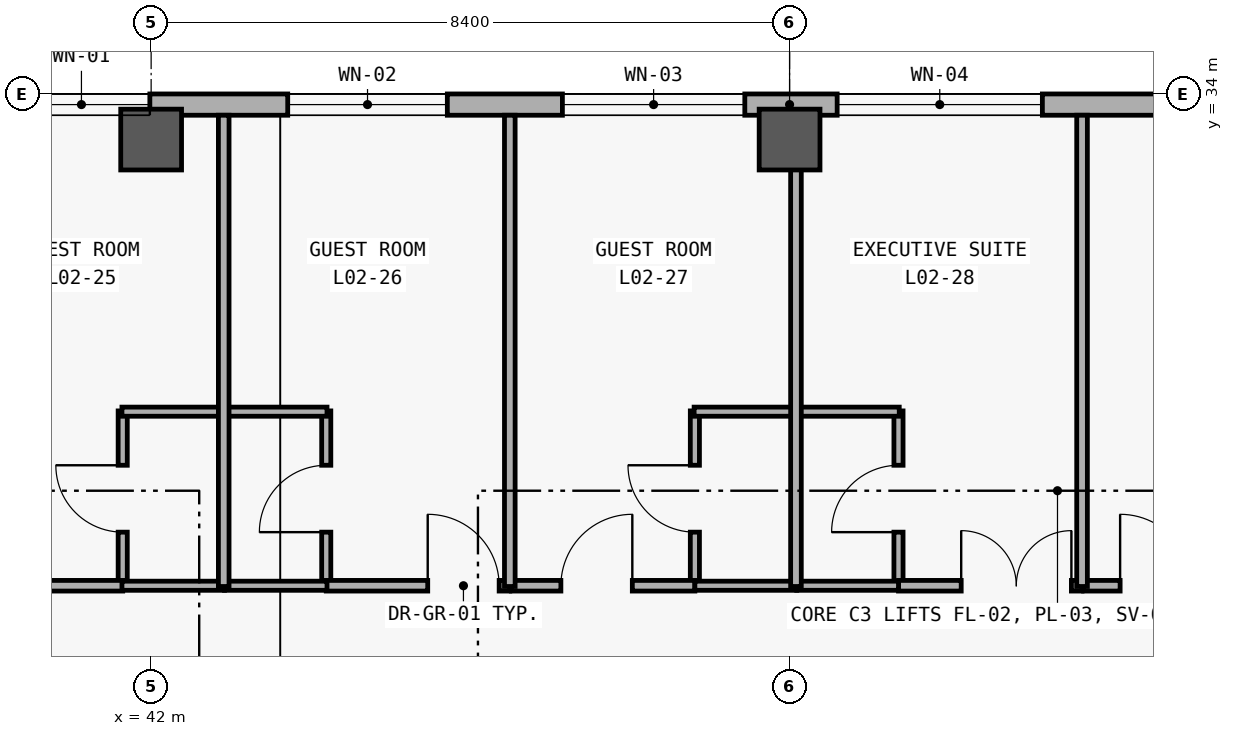
"""IFC4 building model, lengths in metres.
Left out: names, types, materials, properties, quantities, classifications, styles, units other than length and angle.
Written with IfcOpenShell. Run it as: python <this file> out.ifc"""

import sys

from ifc_helpers import new_model, si_unit, direction, frame, frame_2d, origin, origin_2d, place, context, subcontext, project, spatial, rectangle, extrude, element, fill, save


model = new_model("IFC4")
c1 = context("Model", 3, precision=1e-05, world=origin(), true_north=direction((0.0, 1.0)))
c2 = subcontext(c1, "Body", "Model", "MODEL_VIEW")
j1 = project(units=[si_unit("LENGTHUNIT", "METRE"), si_unit("PLANEANGLEUNIT", "RADIAN")], contexts=[c1])
p1 = place(None, origin())
s1 = spatial("IfcSite", under=j1, at=p1, CompositionType="ELEMENT")
p2 = place(p1, origin())
s2 = spatial("IfcBuilding", under=s1, at=p2, CompositionType="ELEMENT")
p3 = place(p2, frame((0.0, 0.0, 10.8)))
s3 = spatial("IfcBuildingStorey", under=s2, at=p3, CompositionType="ELEMENT", Elevation=10.8)
for number, where, z_axis, x_axis in (
    (1, (42.0, 33.4, 0.0), (0.0, 0.0, 1.0), (1.0, 0.0, 0.0)),
    (2, (50.4, 33.4, 0.0), (0.0, 0.0, 1.0), (1.0, 0.0, 0.0)),
):
    element("IfcColumn", number, at=place(p3, frame(where, z_axis=z_axis, x_axis=x_axis)), inside=s3, PredefinedType="COLUMN", context=c2, shape_type="SweptSolid", body=[
        extrude(rectangle(XDim=0.8, YDim=0.8, at=origin_2d()), origin(), (0.0, 0.0, 1.0), 4.2),
    ])
p4 = place(p3, frame((8.68, 33.86, 0.0), z_axis=(0.0, 0.0, 1.0), x_axis=(1.0, 0.0, 0.0)))
e3 = element("IfcWall", 3, at=p4, inside=s3, PredefinedType="SOLIDWALL", context=c2, shape_type="SweptSolid", body=[
    extrude(rectangle(XDim=83.44, YDim=0.28, at=frame_2d((41.72, 0.0))), origin(), (0.0, 0.0, 1.0), 3.92),
])
p5 = place(p4, frame((5.07, 0.0, 0.85)))
e4 = element("IfcOpeningElement", 4, at=p5, cuts=e3, PredefinedType="OPENING", context=c2, shape_type="SweptSolid", body=[
    extrude(rectangle(XDim=1.7, YDim=2.0, at=frame_2d((0.85, 1.0))), frame((0.0, 0.15, 0.0), z_axis=(0.0, -1.0, 0.0), x_axis=(1.0, 0.0, 0.0)), (0.0, 0.0, 1.0), 0.3),
])
p6 = place(p4, frame((12.557, 0.0, 0.85)))
e5 = element("IfcOpeningElement", 5, at=p6, cuts=e3, PredefinedType="OPENING", context=c2, shape_type="SweptSolid", body=[
    extrude(rectangle(XDim=2.05, YDim=1.95, at=frame_2d((1.025, 0.975))), frame((0.0, 0.15, 0.0), z_axis=(0.0, -1.0, 0.0), x_axis=(1.0, 0.0, 0.0)), (0.0, 0.0, 1.0), 0.3),
])
p7 = place(p4, frame((16.256, 0.0, 0.85)))
e6 = element("IfcOpeningElement", 6, at=p7, cuts=e3, PredefinedType="OPENING", context=c2, shape_type="SweptSolid", body=[
    extrude(rectangle(XDim=2.18, YDim=1.95, at=frame_2d((1.09, 0.975))), frame((0.0, 0.15, 0.0), z_axis=(0.0, -1.0, 0.0), x_axis=(1.0, 0.0, 0.0)), (0.0, 0.0, 1.0), 0.3),
])
p8 = place(p4, frame((19.921, 0.0, 0.85)))
e7 = element("IfcOpeningElement", 7, at=p8, cuts=e3, PredefinedType="OPENING", context=c2, shape_type="SweptSolid", body=[
    extrude(rectangle(XDim=2.38, YDim=1.95, at=frame_2d((1.19, 0.975))), frame((0.0, 0.15, 0.0), z_axis=(0.0, -1.0, 0.0), x_axis=(1.0, 0.0, 0.0)), (0.0, 0.0, 1.0), 0.3),
])
p9 = place(p4, frame((23.635, 0.0, 0.85)))
e8 = element("IfcOpeningElement", 8, at=p9, cuts=e3, PredefinedType="OPENING", context=c2, shape_type="SweptSolid", body=[
    extrude(rectangle(XDim=2.48, YDim=2.0, at=frame_2d((1.24, 1.0))), frame((0.0, 0.15, 0.0), z_axis=(0.0, -1.0, 0.0), x_axis=(1.0, 0.0, 0.0)), (0.0, 0.0, 1.0), 0.3),
])
p10 = place(p4, frame((27.314, 0.0, 0.85)))
e9 = element("IfcOpeningElement", 9, at=p10, cuts=e3, PredefinedType="OPENING", context=c2, shape_type="SweptSolid", body=[
    extrude(rectangle(XDim=2.65, YDim=2.0, at=frame_2d((1.325, 1.0))), frame((0.0, 0.15, 0.0), z_axis=(0.0, -1.0, 0.0), x_axis=(1.0, 0.0, 0.0)), (0.0, 0.0, 1.0), 0.3),
])
p11 = place(p4, frame((31.503, 0.0, 0.85)))
e10 = element("IfcOpeningElement", 10, at=p11, cuts=e3, PredefinedType="OPENING", context=c2, shape_type="SweptSolid", body=[
    extrude(rectangle(XDim=1.8, YDim=1.8, at=frame_2d((0.9, 0.9))), frame((0.0, 0.15, 0.0), z_axis=(0.0, -1.0, 0.0), x_axis=(1.0, 0.0, 0.0)), (0.0, 0.0, 1.0), 0.3),
])
p12 = place(p4, frame((35.117, 0.0, 0.85)))
e11 = element("IfcOpeningElement", 11, at=p12, cuts=e3, PredefinedType="OPENING", context=c2, shape_type="SweptSolid", body=[
    extrude(rectangle(XDim=2.1, YDim=1.8, at=frame_2d((1.05, 0.9))), frame((0.0, 0.15, 0.0), z_axis=(0.0, -1.0, 0.0), x_axis=(1.0, 0.0, 0.0)), (0.0, 0.0, 1.0), 0.3),
])
p13 = place(p4, frame((38.731, 0.0, 0.85)))
e12 = element("IfcOpeningElement", 12, at=p13, cuts=e3, PredefinedType="OPENING", context=c2, shape_type="SweptSolid", body=[
    extrude(rectangle(XDim=2.4, YDim=1.8, at=frame_2d((1.2, 0.9))), frame((0.0, 0.15, 0.0), z_axis=(0.0, -1.0, 0.0), x_axis=(1.0, 0.0, 0.0)), (0.0, 0.0, 1.0), 0.3),
])
p14 = place(p4, frame((42.346, 0.0, 0.85)))
e13 = element("IfcOpeningElement", 13, at=p14, cuts=e3, PredefinedType="OPENING", context=c2, shape_type="SweptSolid", body=[
    extrude(rectangle(XDim=2.7, YDim=1.85, at=frame_2d((1.35, 0.925))), frame((0.0, 0.15, 0.0), z_axis=(0.0, -1.0, 0.0), x_axis=(1.0, 0.0, 0.0)), (0.0, 0.0, 1.0), 0.3),
])
p15 = place(p4, frame((46.71, 0.0, 0.85)))
e14 = element("IfcOpeningElement", 14, at=p15, cuts=e3, PredefinedType="OPENING", context=c2, shape_type="SweptSolid", body=[
    extrude(rectangle(XDim=1.5, YDim=1.75, at=frame_2d((0.75, 0.875))), frame((0.0, 0.15, 0.0), z_axis=(0.0, -1.0, 0.0), x_axis=(1.0, 0.0, 0.0)), (0.0, 0.0, 1.0), 0.3),
])
p16 = place(p4, frame((50.399, 0.0, 0.85)))
e15 = element("IfcOpeningElement", 15, at=p16, cuts=e3, PredefinedType="OPENING", context=c2, shape_type="SweptSolid", body=[
    extrude(rectangle(XDim=1.65, YDim=1.75, at=frame_2d((0.825, 0.875))), frame((0.0, 0.15, 0.0), z_axis=(0.0, -1.0, 0.0), x_axis=(1.0, 0.0, 0.0)), (0.0, 0.0, 1.0), 0.3),
])
p17 = place(p4, frame((54.014, 0.0, 0.85)))
e16 = element("IfcOpeningElement", 16, at=p17, cuts=e3, PredefinedType="OPENING", context=c2, shape_type="SweptSolid", body=[
    extrude(rectangle(XDim=1.95, YDim=1.75, at=frame_2d((0.975, 0.875))), frame((0.0, 0.15, 0.0), z_axis=(0.0, -1.0, 0.0), x_axis=(1.0, 0.0, 0.0)), (0.0, 0.0, 1.0), 0.3),
])
p18 = place(p4, frame((57.628, 0.0, 0.85)))
e17 = element("IfcOpeningElement", 17, at=p18, cuts=e3, PredefinedType="OPENING", context=c2, shape_type="SweptSolid", body=[
    extrude(rectangle(XDim=2.25, YDim=1.75, at=frame_2d((1.125, 0.875))), frame((0.0, 0.15, 0.0), z_axis=(0.0, -1.0, 0.0), x_axis=(1.0, 0.0, 0.0)), (0.0, 0.0, 1.0), 0.3),
])
p19 = place(p4, frame((61.242, 0.0, 0.85)))
e18 = element("IfcOpeningElement", 18, at=p19, cuts=e3, PredefinedType="OPENING", context=c2, shape_type="SweptSolid", body=[
    extrude(rectangle(XDim=2.55, YDim=1.8, at=frame_2d((1.275, 0.9))), frame((0.0, 0.15, 0.0), z_axis=(0.0, -1.0, 0.0), x_axis=(1.0, 0.0, 0.0)), (0.0, 0.0, 1.0), 0.3),
])
p20 = place(p4, frame((64.856, 0.0, 0.85)))
e19 = element("IfcOpeningElement", 19, at=p20, cuts=e3, PredefinedType="OPENING", context=c2, shape_type="SweptSolid", body=[
    extrude(rectangle(XDim=2.85, YDim=1.85, at=frame_2d((1.425, 0.925))), frame((0.0, 0.15, 0.0), z_axis=(0.0, -1.0, 0.0), x_axis=(1.0, 0.0, 0.0)), (0.0, 0.0, 1.0), 0.3),
])
p21 = place(p4, frame((69.345, 0.0, 0.85)))
e20 = element("IfcOpeningElement", 20, at=p21, cuts=e3, PredefinedType="OPENING", context=c2, shape_type="SweptSolid", body=[
    extrude(rectangle(XDim=1.4, YDim=1.6, at=frame_2d((0.7, 0.8))), frame((0.0, 0.15, 0.0), z_axis=(0.0, -1.0, 0.0), x_axis=(1.0, 0.0, 0.0)), (0.0, 0.0, 1.0), 0.3),
])
p22 = place(p4, frame((73.009, 0.0, 0.85)))
e21 = element("IfcOpeningElement", 21, at=p22, cuts=e3, PredefinedType="OPENING", context=c2, shape_type="SweptSolid", body=[
    extrude(rectangle(XDim=1.6, YDim=1.6, at=frame_2d((0.8, 0.8))), frame((0.0, 0.15, 0.0), z_axis=(0.0, -1.0, 0.0), x_axis=(1.0, 0.0, 0.0)), (0.0, 0.0, 1.0), 0.3),
])
p23 = place(p4, frame((76.674, 0.0, 0.85)))
e22 = element("IfcOpeningElement", 22, at=p23, cuts=e3, PredefinedType="OPENING", context=c2, shape_type="SweptSolid", body=[
    extrude(rectangle(XDim=1.8, YDim=1.6, at=frame_2d((0.9, 0.8))), frame((0.0, 0.15, 0.0), z_axis=(0.0, -1.0, 0.0), x_axis=(1.0, 0.0, 0.0)), (0.0, 0.0, 1.0), 0.3),
])
p24 = place(p4, frame((80.338, 0.0, 0.85)))
e23 = element("IfcOpeningElement", 23, at=p24, cuts=e3, PredefinedType="OPENING", context=c2, shape_type="SweptSolid", body=[
    extrude(rectangle(XDim=2.0, YDim=1.65, at=frame_2d((1.0, 0.825))), frame((0.0, 0.15, 0.0), z_axis=(0.0, -1.0, 0.0), x_axis=(1.0, 0.0, 0.0)), (0.0, 0.0, 1.0), 0.3),
])
p25 = place(p3, frame((41.626, 27.52, 0.0), z_axis=(0.0, 0.0, 1.0), x_axis=(0.0, 1.0, 0.0)))
e24 = element("IfcWall", 24, at=p25, inside=s3, PredefinedType="PARTITIONING", context=c2, shape_type="SweptSolid", body=[
    extrude(rectangle(XDim=2.31, YDim=0.12, at=frame_2d((1.155, 0.0))), origin(), (0.0, 0.0, 1.0), 3.02),
])
p26 = place(p25, frame((0.715, 0.0, 0.0)))
e25 = element("IfcOpeningElement", 25, at=p26, cuts=e24, PredefinedType="OPENING", context=c2, shape_type="SweptSolid", body=[
    extrude(rectangle(XDim=0.88, YDim=2.15, at=frame_2d((0.44, 1.075))), frame((0.0, 0.07, 0.0), z_axis=(0.0, -1.0, 0.0), x_axis=(1.0, 0.0, 0.0)), (0.0, 0.0, 1.0), 0.14),
])
p27 = place(p3, frame((44.304, 27.52, 0.0), z_axis=(0.0, 0.0, 1.0), x_axis=(0.0, 1.0, 0.0)))
e26 = element("IfcWall", 26, at=p27, inside=s3, PredefinedType="PARTITIONING", context=c2, shape_type="SweptSolid", body=[
    extrude(rectangle(XDim=2.31, YDim=0.12, at=frame_2d((1.155, 0.0))), origin(), (0.0, 0.0, 1.0), 3.02),
])
p28 = place(p27, frame((0.715, 0.0, 0.0)))
e27 = element("IfcOpeningElement", 27, at=p28, cuts=e26, PredefinedType="OPENING", context=c2, shape_type="SweptSolid", body=[
    extrude(rectangle(XDim=0.88, YDim=2.15, at=frame_2d((0.44, 1.075))), frame((0.0, 0.07, 0.0), z_axis=(0.0, -1.0, 0.0), x_axis=(1.0, 0.0, 0.0)), (0.0, 0.0, 1.0), 0.14),
])
p29 = place(p3, frame((49.154, 27.52, 0.0), z_axis=(0.0, 0.0, 1.0), x_axis=(0.0, 1.0, 0.0)))
e28 = element("IfcWall", 28, at=p29, inside=s3, PredefinedType="PARTITIONING", context=c2, shape_type="SweptSolid", body=[
    extrude(rectangle(XDim=2.31, YDim=0.12, at=frame_2d((1.155, 0.0))), origin(), (0.0, 0.0, 1.0), 3.02),
])
p30 = place(p29, frame((0.715, 0.0, 0.0)))
e29 = element("IfcOpeningElement", 29, at=p30, cuts=e28, PredefinedType="OPENING", context=c2, shape_type="SweptSolid", body=[
    extrude(rectangle(XDim=0.88, YDim=2.15, at=frame_2d((0.44, 1.075))), frame((0.0, 0.07, 0.0), z_axis=(0.0, -1.0, 0.0), x_axis=(1.0, 0.0, 0.0)), (0.0, 0.0, 1.0), 0.14),
])
p31 = place(p3, frame((51.833, 27.52, 0.0), z_axis=(0.0, 0.0, 1.0), x_axis=(0.0, 1.0, 0.0)))
e30 = element("IfcWall", 30, at=p31, inside=s3, PredefinedType="PARTITIONING", context=c2, shape_type="SweptSolid", body=[
    extrude(rectangle(XDim=2.31, YDim=0.12, at=frame_2d((1.155, 0.0))), origin(), (0.0, 0.0, 1.0), 3.02),
])
p32 = place(p31, frame((0.715, 0.0, 0.0)))
e31 = element("IfcOpeningElement", 31, at=p32, cuts=e30, PredefinedType="OPENING", context=c2, shape_type="SweptSolid", body=[
    extrude(rectangle(XDim=0.88, YDim=2.15, at=frame_2d((0.44, 1.075))), frame((0.0, 0.07, 0.0), z_axis=(0.0, -1.0, 0.0), x_axis=(1.0, 0.0, 0.0)), (0.0, 0.0, 1.0), 0.14),
])
p33 = place(p3, frame((39.211, 27.53, 0.0), z_axis=(0.0, 0.0, 1.0), x_axis=(1.0, 0.0, 0.0)))
e32 = element("IfcWall", 32, at=p33, inside=s3, PredefinedType="PARTITIONING", context=c2, shape_type="SweptSolid", body=[
    extrude(rectangle(XDim=2.415, YDim=0.14, at=frame_2d((1.208, 0.0))), origin(), (0.0, 0.0, 1.0), 3.02),
])
p34 = place(p33, frame((0.481, 0.0, 0.0)))
e33 = element("IfcOpeningElement", 33, at=p34, cuts=e32, PredefinedType="OPENING", context=c2, shape_type="SweptSolid", body=[
    extrude(rectangle(XDim=0.94, YDim=2.2, at=frame_2d((0.47, 1.1))), frame((0.0, 0.08, 0.0), z_axis=(0.0, -1.0, 0.0), x_axis=(1.0, 0.0, 0.0)), (0.0, 0.0, 1.0), 0.16),
])
p35 = place(p3, frame((44.304, 27.53, 0.0), z_axis=(0.0, 0.0, 1.0), x_axis=(1.0, 0.0, 0.0)))
e34 = element("IfcWall", 34, at=p35, inside=s3, PredefinedType="PARTITIONING", context=c2, shape_type="SweptSolid", body=[
    extrude(rectangle(XDim=2.415, YDim=0.14, at=frame_2d((1.208, 0.0))), origin(), (0.0, 0.0, 1.0), 3.02),
])
p36 = place(p35, frame((1.335, 0.0, 0.0)))
e35 = element("IfcOpeningElement", 35, at=p36, cuts=e34, PredefinedType="OPENING", context=c2, shape_type="SweptSolid", body=[
    extrude(rectangle(XDim=0.94, YDim=2.2, at=frame_2d((0.47, 1.1))), frame((0.0, 0.08, 0.0), z_axis=(0.0, -1.0, 0.0), x_axis=(1.0, 0.0, 0.0)), (0.0, 0.0, 1.0), 0.16),
])
p37 = place(p3, frame((46.739, 27.53, 0.0), z_axis=(0.0, 0.0, 1.0), x_axis=(1.0, 0.0, 0.0)))
e36 = element("IfcWall", 36, at=p37, inside=s3, PredefinedType="PARTITIONING", context=c2, shape_type="SweptSolid", body=[
    extrude(rectangle(XDim=2.415, YDim=0.14, at=frame_2d((1.208, 0.0))), origin(), (0.0, 0.0, 1.0), 3.02),
])
p38 = place(p37, frame((0.652, 0.0, 0.0)))
e37 = element("IfcOpeningElement", 37, at=p38, cuts=e36, PredefinedType="OPENING", context=c2, shape_type="SweptSolid", body=[
    extrude(rectangle(XDim=0.94, YDim=2.2, at=frame_2d((0.47, 1.1))), frame((0.0, 0.08, 0.0), z_axis=(0.0, -1.0, 0.0), x_axis=(1.0, 0.0, 0.0)), (0.0, 0.0, 1.0), 0.16),
])
p39 = place(p3, frame((51.833, 27.53, 0.0), z_axis=(0.0, 0.0, 1.0), x_axis=(1.0, 0.0, 0.0)))
e38 = element("IfcWall", 38, at=p39, inside=s3, PredefinedType="PARTITIONING", context=c2, shape_type="SweptSolid", body=[
    extrude(rectangle(XDim=2.415, YDim=0.14, at=frame_2d((1.208, 0.0))), origin(), (0.0, 0.0, 1.0), 3.02),
])
p40 = place(p39, frame((0.825, 0.0, 0.0)))
e39 = element("IfcOpeningElement", 39, at=p40, cuts=e38, PredefinedType="OPENING", context=c2, shape_type="SweptSolid", body=[
    extrude(rectangle(XDim=1.45, YDim=2.3, at=frame_2d((0.725, 1.15))), frame((0.0, 0.08, 0.0), z_axis=(0.0, -1.0, 0.0), x_axis=(1.0, 0.0, 0.0)), (0.0, 0.0, 1.0), 0.16),
])
p41 = place(p3, frame((54.268, 27.53, 0.0), z_axis=(0.0, 0.0, 1.0), x_axis=(1.0, 0.0, 0.0)))
e40 = element("IfcWall", 40, at=p41, inside=s3, PredefinedType="PARTITIONING", context=c2, shape_type="SweptSolid", body=[
    extrude(rectangle(XDim=2.415, YDim=0.14, at=frame_2d((1.208, 0.0))), origin(), (0.0, 0.0, 1.0), 3.02),
])
p42 = place(p41, frame((0.481, 0.0, 0.0)))
e41 = element("IfcOpeningElement", 41, at=p42, cuts=e40, PredefinedType="OPENING", context=c2, shape_type="SweptSolid", body=[
    extrude(rectangle(XDim=0.94, YDim=2.2, at=frame_2d((0.47, 1.1))), frame((0.0, 0.08, 0.0), z_axis=(0.0, -1.0, 0.0), x_axis=(1.0, 0.0, 0.0)), (0.0, 0.0, 1.0), 0.16),
])
for number, where, z_axis, x_axis in (
    (42, (41.616, 27.53, 0.0), (0.0, 0.0, 1.0), (1.0, 0.0, 0.0)),
    (43, (41.616, 29.82, 0.0), (0.0, 0.0, 1.0), (1.0, 0.0, 0.0)),
):
    element("IfcWall", number, at=place(p3, frame(where, z_axis=z_axis, x_axis=x_axis)), inside=s3, PredefinedType="PARTITIONING", context=c2, shape_type="SweptSolid", body=[
        extrude(rectangle(XDim=1.349, YDim=0.12, at=frame_2d((0.675, 0.0))), origin(), (0.0, 0.0, 1.0), 3.02),
    ])
for number, where, z_axis, x_axis in (
    (44, (42.965, 27.53, 0.0), (0.0, 0.0, 1.0), (1.0, 0.0, 0.0)),
    (45, (42.965, 29.82, 0.0), (0.0, 0.0, 1.0), (1.0, 0.0, 0.0)),
):
    element("IfcWall", number, at=place(p3, frame(where, z_axis=z_axis, x_axis=x_axis)), inside=s3, PredefinedType="PARTITIONING", context=c2, shape_type="SweptSolid", body=[
        extrude(rectangle(XDim=1.349, YDim=0.12, at=frame_2d((0.674, 0.0))), origin(), (0.0, 0.0, 1.0), 3.02),
    ])
p43 = place(p3, frame((49.154, 27.53, 0.0), z_axis=(0.0, 0.0, 1.0), x_axis=(1.0, 0.0, 0.0)))
e46 = element("IfcWall", 46, at=p43, inside=s3, PredefinedType="PARTITIONING", context=c2, shape_type="SweptSolid", body=[
    extrude(rectangle(XDim=1.34, YDim=0.12, at=frame_2d((0.67, 0.0))), origin(), (0.0, 0.0, 1.0), 3.02),
])
p44 = place(p3, frame((49.144, 29.82, 0.0), z_axis=(0.0, 0.0, 1.0), x_axis=(1.0, 0.0, 0.0)))
e47 = element("IfcWall", 47, at=p44, inside=s3, PredefinedType="PARTITIONING", context=c2, shape_type="SweptSolid", body=[
    extrude(rectangle(XDim=1.35, YDim=0.12, at=frame_2d((0.675, 0.0))), origin(), (0.0, 0.0, 1.0), 3.02),
])
p45 = place(p3, frame((50.494, 27.53, 0.0), z_axis=(0.0, 0.0, 1.0), x_axis=(1.0, 0.0, 0.0)))
e48 = element("IfcWall", 48, at=p45, inside=s3, PredefinedType="PARTITIONING", context=c2, shape_type="SweptSolid", body=[
    extrude(rectangle(XDim=1.339, YDim=0.12, at=frame_2d((0.669, 0.0))), origin(), (0.0, 0.0, 1.0), 3.02),
])
p46 = place(p3, frame((50.494, 29.82, 0.0), z_axis=(0.0, 0.0, 1.0), x_axis=(1.0, 0.0, 0.0)))
e49 = element("IfcWall", 49, at=p46, inside=s3, PredefinedType="PARTITIONING", context=c2, shape_type="SweptSolid", body=[
    extrude(rectangle(XDim=1.349, YDim=0.12, at=frame_2d((0.675, 0.0))), origin(), (0.0, 0.0, 1.0), 3.02),
])
for number, where, z_axis, x_axis in (
    (50, (42.955, 27.52, 0.0), (0.0, 0.0, 1.0), (0.0, 1.0, 0.0)),
    (51, (46.719, 27.52, 0.0), (0.0, 0.0, 1.0), (0.0, 1.0, 0.0)),
    (52, (50.484, 27.52, 0.0), (0.0, 0.0, 1.0), (0.0, 1.0, 0.0)),
    (53, (54.248, 27.52, 0.0), (0.0, 0.0, 1.0), (0.0, 1.0, 0.0)),
):
    element("IfcWall", number, at=place(p3, frame(where, z_axis=z_axis, x_axis=x_axis)), inside=s3, PredefinedType="PARTITIONING", context=c2, shape_type="SweptSolid", body=[
        extrude(rectangle(XDim=6.2, YDim=0.14, at=frame_2d((3.1, 0.0))), origin(), (0.0, 0.0, 1.0), 3.02),
    ])
p47 = place(p11, origin())
e54 = element("IfcWindow", 54, at=p47, inside=s3, PartitioningType="SINGLE_PANEL", PredefinedType="WINDOW", context=c2, shape_type="SweptSolid", body=[
    extrude(rectangle(XDim=1.8, YDim=1.8, at=frame_2d((0.9, 0.9))), frame((0.0, 0.03, 0.0), z_axis=(0.0, -1.0, 0.0), x_axis=(1.0, 0.0, 0.0)), (0.0, 0.0, 1.0), 0.06),
])
fill(e10, e54)
p48 = place(p12, origin())
e55 = element("IfcWindow", 55, at=p48, inside=s3, PartitioningType="SINGLE_PANEL", PredefinedType="WINDOW", context=c2, shape_type="SweptSolid", body=[
    extrude(rectangle(XDim=2.1, YDim=1.8, at=frame_2d((1.05, 0.9))), frame((0.0, 0.03, 0.0), z_axis=(0.0, -1.0, 0.0), x_axis=(1.0, 0.0, 0.0)), (0.0, 0.0, 1.0), 0.06),
])
fill(e11, e55)
p49 = place(p13, origin())
e56 = element("IfcWindow", 56, at=p49, inside=s3, PartitioningType="SINGLE_PANEL", PredefinedType="WINDOW", context=c2, shape_type="SweptSolid", body=[
    extrude(rectangle(XDim=2.4, YDim=1.8, at=frame_2d((1.2, 0.9))), frame((0.0, 0.03, 0.0), z_axis=(0.0, -1.0, 0.0), x_axis=(1.0, 0.0, 0.0)), (0.0, 0.0, 1.0), 0.06),
])
fill(e12, e56)
p50 = place(p14, origin())
e57 = element("IfcWindow", 57, at=p50, inside=s3, PartitioningType="SINGLE_PANEL", PredefinedType="WINDOW", context=c2, shape_type="SweptSolid", body=[
    extrude(rectangle(XDim=2.7, YDim=1.85, at=frame_2d((1.35, 0.925))), frame((0.0, 0.03, 0.0), z_axis=(0.0, -1.0, 0.0), x_axis=(1.0, 0.0, 0.0)), (0.0, 0.0, 1.0), 0.06),
])
fill(e13, e57)
p51 = place(p26, origin())
e58 = element("IfcDoor", 58, at=p51, inside=s3, OperationType="SINGLE_SWING_RIGHT", PredefinedType="DOOR", context=c2, shape_type="SweptSolid", body=[
    extrude(rectangle(XDim=0.88, YDim=2.15, at=frame_2d((0.44, 1.075))), frame((0.0, 0.025, 0.0), z_axis=(0.0, -1.0, 0.0), x_axis=(1.0, 0.0, 0.0)), (0.0, 0.0, 1.0), 0.05),
])
fill(e25, e58)
p52 = place(p28, origin())
e59 = element("IfcDoor", 59, at=p52, inside=s3, OperationType="SINGLE_SWING_LEFT", PredefinedType="DOOR", context=c2, shape_type="SweptSolid", body=[
    extrude(rectangle(XDim=0.88, YDim=2.15, at=frame_2d((0.44, 1.075))), frame((0.0, 0.025, 0.0), z_axis=(0.0, -1.0, 0.0), x_axis=(1.0, 0.0, 0.0)), (0.0, 0.0, 1.0), 0.05),
])
fill(e27, e59)
p53 = place(p30, origin())
e60 = element("IfcDoor", 60, at=p53, inside=s3, OperationType="SINGLE_SWING_RIGHT", PredefinedType="DOOR", context=c2, shape_type="SweptSolid", body=[
    extrude(rectangle(XDim=0.88, YDim=2.15, at=frame_2d((0.44, 1.075))), frame((0.0, 0.025, 0.0), z_axis=(0.0, -1.0, 0.0), x_axis=(1.0, 0.0, 0.0)), (0.0, 0.0, 1.0), 0.05),
])
fill(e29, e60)
p54 = place(p32, origin())
e61 = element("IfcDoor", 61, at=p54, inside=s3, OperationType="SINGLE_SWING_LEFT", PredefinedType="DOOR", context=c2, shape_type="SweptSolid", body=[
    extrude(rectangle(XDim=0.88, YDim=2.15, at=frame_2d((0.44, 1.075))), frame((0.0, 0.025, 0.0), z_axis=(0.0, -1.0, 0.0), x_axis=(1.0, 0.0, 0.0)), (0.0, 0.0, 1.0), 0.05),
])
fill(e31, e61)
p55 = place(p36, origin())
e62 = element("IfcDoor", 62, at=p55, inside=s3, OperationType="SINGLE_SWING_LEFT", PredefinedType="DOOR", context=c2, shape_type="SweptSolid", body=[
    extrude(rectangle(XDim=0.94, YDim=2.2, at=frame_2d((0.47, 1.1))), frame((0.0, 0.025, 0.0), z_axis=(0.0, -1.0, 0.0), x_axis=(1.0, 0.0, 0.0)), (0.0, 0.0, 1.0), 0.05),
])
fill(e35, e62)
p56 = place(p38, origin())
e63 = element("IfcDoor", 63, at=p56, inside=s3, OperationType="SINGLE_SWING_RIGHT", PredefinedType="DOOR", context=c2, shape_type="SweptSolid", body=[
    extrude(rectangle(XDim=0.94, YDim=2.2, at=frame_2d((0.47, 1.1))), frame((0.0, 0.025, 0.0), z_axis=(0.0, -1.0, 0.0), x_axis=(1.0, 0.0, 0.0)), (0.0, 0.0, 1.0), 0.05),
])
fill(e37, e63)
p57 = place(p40, origin())
e64 = element("IfcDoor", 64, at=p57, inside=s3, OperationType="DOUBLE_DOOR_SINGLE_SWING", PredefinedType="DOOR", context=c2, shape_type="SweptSolid", body=[
    extrude(rectangle(XDim=1.45, YDim=2.3, at=frame_2d((0.725, 1.15))), frame((0.0, 0.025, 0.0), z_axis=(0.0, -1.0, 0.0), x_axis=(1.0, 0.0, 0.0)), (0.0, 0.0, 1.0), 0.05),
])
fill(e39, e64)
p58 = place(p42, origin())
e65 = element("IfcDoor", 65, at=p58, inside=s3, OperationType="SINGLE_SWING_LEFT", PredefinedType="DOOR", context=c2, shape_type="SweptSolid", body=[
    extrude(rectangle(XDim=0.94, YDim=2.2, at=frame_2d((0.47, 1.1))), frame((0.0, 0.025, 0.0), z_axis=(0.0, -1.0, 0.0), x_axis=(1.0, 0.0, 0.0)), (0.0, 0.0, 1.0), 0.05),
])
fill(e41, e65)
save(model, sys.argv[1])
